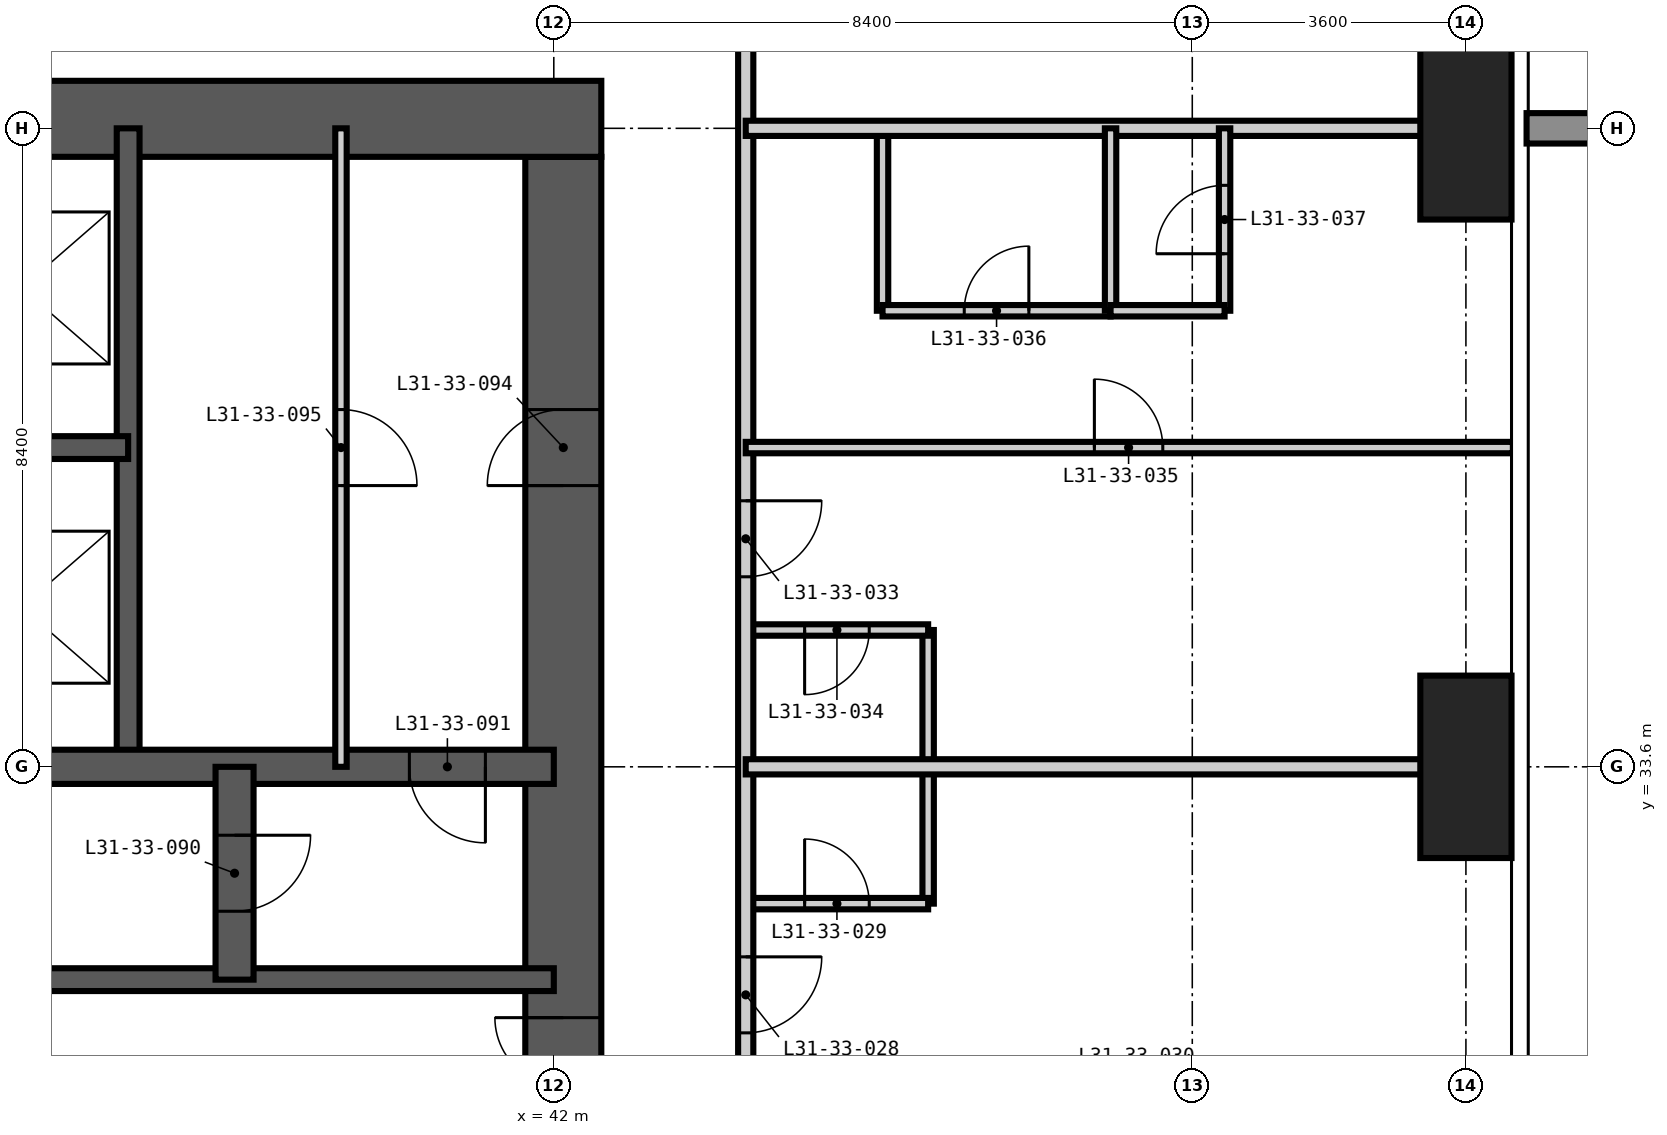
"""IFC4 building model, lengths in metres.
Left out: names, types, materials, properties, quantities, classifications, styles, units other than length and angle.
Written with IfcOpenShell. Run it as: python <this file> out.ifc"""

import sys

from ifc_helpers import new_model, si_unit, direction, frame, frame_2d, origin, origin_2d, place, context, subcontext, project, spatial, rectangle, extrude, element, fill, save


model = new_model("IFC4")
c1 = context("Model", 3, precision=1e-05, world=origin(), true_north=direction((0.0, 1.0)))
c2 = subcontext(c1, "Body", "Model", "MODEL_VIEW")
j1 = project(units=[si_unit("LENGTHUNIT", "METRE"), si_unit("PLANEANGLEUNIT", "RADIAN")], contexts=[c1])
p1 = place(None, origin())
s1 = spatial("IfcSite", under=j1, at=p1, CompositionType="ELEMENT")
p2 = place(p1, origin())
s2 = spatial("IfcBuilding", under=s1, at=p2, CompositionType="ELEMENT")
p3 = place(p2, frame((0.0, 0.0, 122.4)))
s3 = spatial("IfcBuildingStorey", under=s2, at=p3, CompositionType="ELEMENT", Elevation=122.4)
for number, where, z_axis, x_axis in (
    (1, (54.0, 33.6, -0.35), (0.0, 0.0, 1.0), (1.0, 0.0, 0.0)),
    (2, (54.0, 42.0, -0.35), (0.0, 0.0, 1.0), (1.0, 0.0, 0.0)),
):
    element("IfcColumn", number, at=place(p3, frame(where, z_axis=z_axis, x_axis=x_axis)), inside=s3, PredefinedType="COLUMN", context=c2, shape_type="SweptSolid", body=[
        extrude(rectangle(XDim=1.2, YDim=2.4, at=origin_2d()), origin(), (0.0, 0.0, 1.0), 3.6),
    ])
p4 = place(p3, frame((42.125, 17.175, -0.35), z_axis=(0.0, 0.0, 1.0), x_axis=(0.0, 1.0, 0.0)))
e3 = element("IfcWall", 3, at=p4, inside=s3, PredefinedType="SHEAR", context=c2, shape_type="SweptSolid", body=[
    extrude(rectangle(XDim=24.45, YDim=1.0, at=frame_2d((12.225, 0.0))), origin(), (0.0, 0.0, 1.0), 3.6),
])
p5 = place(p4, frame((0.425, 0.0, 0.35)))
e4 = element("IfcOpeningElement", 4, at=p5, cuts=e3, PredefinedType="OPENING", context=c2, shape_type="SweptSolid", body=[
    extrude(rectangle(XDim=1.2, YDim=2.2, at=frame_2d((0.6, 1.1))), frame((0.0, 0.51, 0.0), z_axis=(0.0, -1.0, 0.0), x_axis=(1.0, 0.0, 0.0)), (0.0, 0.0, 1.0), 1.02),
])
p6 = place(p4, frame((11.325, 0.0, 0.35)))
e5 = element("IfcOpeningElement", 5, at=p6, cuts=e3, PredefinedType="OPENING", context=c2, shape_type="SweptSolid", body=[
    extrude(rectangle(XDim=1.8, YDim=2.2, at=frame_2d((0.9, 1.1))), frame((0.0, 0.51, 0.0), z_axis=(0.0, -1.0, 0.0), x_axis=(1.0, 0.0, 0.0)), (0.0, 0.0, 1.0), 1.02),
])
p7 = place(p4, frame((20.125, 0.0, 0.35)))
e6 = element("IfcOpeningElement", 6, at=p7, cuts=e3, PredefinedType="OPENING", context=c2, shape_type="SweptSolid", body=[
    extrude(rectangle(XDim=1.0, YDim=2.1, at=frame_2d((0.5, 1.05))), frame((0.0, 0.51, 0.0), z_axis=(0.0, -1.0, 0.0), x_axis=(1.0, 0.0, 0.0)), (0.0, 0.0, 1.0), 1.02),
])
p8 = place(p3, frame((42.625, 42.125, -0.35), z_axis=(0.0, 0.0, 1.0), x_axis=(-1.0, 0.0, 0.0)))
e7 = element("IfcWall", 7, at=p8, inside=s3, PredefinedType="SHEAR", context=c2, shape_type="SweptSolid", body=[
    extrude(rectangle(XDim=26.45, YDim=1.0, at=frame_2d((13.225, 0.0))), origin(), (0.0, 0.0, 1.0), 3.6),
])
p9 = place(p8, frame((21.125, 0.0, 0.35)))
e8 = element("IfcOpeningElement", 8, at=p9, cuts=e7, PredefinedType="OPENING", context=c2, shape_type="SweptSolid", body=[
    extrude(rectangle(XDim=1.0, YDim=2.1, at=frame_2d((0.5, 1.05))), frame((0.0, 0.51, 0.0), z_axis=(0.0, -1.0, 0.0), x_axis=(1.0, 0.0, 0.0)), (0.0, 0.0, 1.0), 1.02),
])
p10 = place(p8, frame((10.525, 0.0, 0.35)))
e9 = element("IfcOpeningElement", 9, at=p10, cuts=e7, PredefinedType="OPENING", context=c2, shape_type="SweptSolid", body=[
    extrude(rectangle(XDim=1.2, YDim=2.2, at=frame_2d((0.6, 1.1))), frame((0.0, 0.51, 0.0), z_axis=(0.0, -1.0, 0.0), x_axis=(1.0, 0.0, 0.0)), (0.0, 0.0, 1.0), 1.02),
])
for number, where, z_axis, x_axis in (
    (10, (36.4, 33.6, -0.35), (0.0, 0.0, 1.0), (0.0, 1.0, 0.0)),
    (11, (33.6, 30.8, -0.35), (0.0, 0.0, 1.0), (1.0, 0.0, 0.0)),
):
    element("IfcWall", number, at=place(p3, frame(where, z_axis=z_axis, x_axis=x_axis)), inside=s3, PredefinedType="SHEAR", context=c2, shape_type="SweptSolid", body=[
        extrude(rectangle(XDim=8.4, YDim=0.3, at=frame_2d((4.2, 0.0))), origin(), (0.0, 0.0, 1.0), 3.6),
    ])
p11 = place(p3, frame((33.6, 37.8, -0.35), z_axis=(0.0, 0.0, 1.0), x_axis=(1.0, 0.0, 0.0)))
e12 = element("IfcWall", 12, at=p11, inside=s3, PredefinedType="SHEAR", context=c2, shape_type="SweptSolid", body=[
    extrude(rectangle(XDim=2.8, YDim=0.3, at=frame_2d((1.4, 0.0))), origin(), (0.0, 0.0, 1.0), 3.6),
])
p12 = place(p3, frame((16.8, 33.6, -0.35), z_axis=(0.0, 0.0, 1.0), x_axis=(1.0, 0.0, 0.0)))
e13 = element("IfcWall", 13, at=p12, inside=s3, PredefinedType="SHEAR", context=c2, shape_type="SweptSolid", body=[
    extrude(rectangle(XDim=25.2, YDim=0.45, at=frame_2d((12.6, 0.0))), origin(), (0.0, 0.0, 1.0), 3.6),
])
p13 = place(p12, frame((23.3, 0.0, 0.35)))
e14 = element("IfcOpeningElement", 14, at=p13, cuts=e13, PredefinedType="OPENING", context=c2, shape_type="SweptSolid", body=[
    extrude(rectangle(XDim=1.0, YDim=2.1, at=frame_2d((0.5, 1.05))), frame((0.0, 0.235, 0.0), z_axis=(0.0, -1.0, 0.0), x_axis=(1.0, 0.0, 0.0)), (0.0, 0.0, 1.0), 0.47),
])
p14 = place(p3, frame((37.8, 30.8, -0.35), z_axis=(0.0, 0.0, 1.0), x_axis=(0.0, 1.0, 0.0)))
e15 = element("IfcWall", 15, at=p14, inside=s3, PredefinedType="SHEAR", context=c2, shape_type="SweptSolid", body=[
    extrude(rectangle(XDim=2.8, YDim=0.5, at=frame_2d((1.4, 0.0))), origin(), (0.0, 0.0, 1.0), 3.6),
])
p15 = place(p14, frame((0.9, 0.0, 0.35)))
e16 = element("IfcOpeningElement", 16, at=p15, cuts=e15, PredefinedType="OPENING", context=c2, shape_type="SweptSolid", body=[
    extrude(rectangle(XDim=1.0, YDim=2.1, at=frame_2d((0.5, 1.05))), frame((0.0, 0.26, 0.0), z_axis=(0.0, -1.0, 0.0), x_axis=(1.0, 0.0, 0.0)), (0.0, 0.0, 1.0), 0.52),
])
p16 = place(p3, frame((46.325, 39.6, 0.0), z_axis=(0.0, 0.0, 1.0), x_axis=(0.0, 1.0, 0.0)))
e17 = element("IfcWall", 17, at=p16, inside=s3, PredefinedType="PARTITIONING", context=c2, shape_type="SweptSolid", body=[
    extrude(rectangle(XDim=2.4, YDim=0.15, at=frame_2d((1.2, 0.0))), origin(), (0.0, 0.0, 1.0), 3.25),
])
p17 = place(p3, frame((46.925, 31.8, 0.0), z_axis=(0.0, 0.0, 1.0), x_axis=(0.0, 1.0, 0.0)))
e18 = element("IfcWall", 18, at=p17, inside=s3, PredefinedType="PARTITIONING", context=c2, shape_type="SweptSolid", body=[
    extrude(rectangle(XDim=3.6, YDim=0.15, at=frame_2d((1.8, 0.0))), origin(), (0.0, 0.0, 1.0), 3.25),
])
p18 = place(p3, frame((44.525, 31.8, 0.0), z_axis=(0.0, 0.0, 1.0), x_axis=(1.0, 0.0, 0.0)))
e19 = element("IfcWall", 19, at=p18, inside=s3, PredefinedType="PARTITIONING", context=c2, shape_type="SweptSolid", body=[
    extrude(rectangle(XDim=2.4, YDim=0.15, at=frame_2d((1.2, 0.0))), origin(), (0.0, 0.0, 1.0), 3.25),
])
p19 = place(p18, frame((0.775, 0.0, 0.0)))
e20 = element("IfcOpeningElement", 20, at=p19, cuts=e19, PredefinedType="OPENING", context=c2, shape_type="SweptSolid", body=[
    extrude(rectangle(XDim=0.85, YDim=2.1, at=frame_2d((0.425, 1.05))), frame((0.0, 0.085, 0.0), z_axis=(0.0, -1.0, 0.0), x_axis=(1.0, 0.0, 0.0)), (0.0, 0.0, 1.0), 0.17),
])
p20 = place(p3, frame((44.525, 35.4, 0.0), z_axis=(0.0, 0.0, 1.0), x_axis=(1.0, 0.0, 0.0)))
e21 = element("IfcWall", 21, at=p20, inside=s3, PredefinedType="PARTITIONING", context=c2, shape_type="SweptSolid", body=[
    extrude(rectangle(XDim=2.4, YDim=0.15, at=frame_2d((1.2, 0.0))), origin(), (0.0, 0.0, 1.0), 3.25),
])
p21 = place(p20, frame((0.775, 0.0, 0.0)))
e22 = element("IfcOpeningElement", 22, at=p21, cuts=e21, PredefinedType="OPENING", context=c2, shape_type="SweptSolid", body=[
    extrude(rectangle(XDim=0.85, YDim=2.1, at=frame_2d((0.425, 1.05))), frame((0.0, 0.085, 0.0), z_axis=(0.0, -1.0, 0.0), x_axis=(1.0, 0.0, 0.0)), (0.0, 0.0, 1.0), 0.17),
])
p22 = place(p3, frame((46.325, 39.6, 0.0), z_axis=(0.0, 0.0, 1.0), x_axis=(1.0, 0.0, 0.0)))
e23 = element("IfcWall", 23, at=p22, inside=s3, PredefinedType="PARTITIONING", context=c2, shape_type="SweptSolid", body=[
    extrude(rectangle(XDim=3.0, YDim=0.15, at=frame_2d((1.5, 0.0))), origin(), (0.0, 0.0, 1.0), 3.25),
])
p23 = place(p22, frame((1.075, 0.0, 0.0)))
e24 = element("IfcOpeningElement", 24, at=p23, cuts=e23, PredefinedType="OPENING", context=c2, shape_type="SweptSolid", body=[
    extrude(rectangle(XDim=0.85, YDim=2.1, at=frame_2d((0.425, 1.05))), frame((0.0, 0.085, 0.0), z_axis=(0.0, -1.0, 0.0), x_axis=(1.0, 0.0, 0.0)), (0.0, 0.0, 1.0), 0.17),
])
p24 = place(p3, frame((44.525, 45.725, 0.0), z_axis=(0.0, 0.0, 1.0), x_axis=(0.0, -1.0, 0.0)))
e25 = element("IfcWall", 25, at=p24, inside=s3, PredefinedType="PARTITIONING", context=c2, shape_type="SweptSolid", body=[
    extrude(rectangle(XDim=32.05, YDim=0.2, at=frame_2d((16.025, 0.0))), origin(), (0.0, 0.0, 1.0), 3.25),
])
p25 = place(p24, frame((25.425, 0.0, 0.0)))
e26 = element("IfcOpeningElement", 26, at=p25, cuts=e25, PredefinedType="OPENING", context=c2, shape_type="SweptSolid", body=[
    extrude(rectangle(XDim=1.0, YDim=2.2, at=frame_2d((0.5, 1.1))), frame((0.0, 0.11, 0.0), z_axis=(0.0, -1.0, 0.0), x_axis=(1.0, 0.0, 0.0)), (0.0, 0.0, 1.0), 0.22),
])
p26 = place(p24, frame((14.625, 0.0, 0.0)))
e27 = element("IfcOpeningElement", 27, at=p26, cuts=e25, PredefinedType="OPENING", context=c2, shape_type="SweptSolid", body=[
    extrude(rectangle(XDim=1.0, YDim=2.2, at=frame_2d((0.5, 1.1))), frame((0.0, 0.11, 0.0), z_axis=(0.0, -1.0, 0.0), x_axis=(1.0, 0.0, 0.0)), (0.0, 0.0, 1.0), 0.22),
])
p27 = place(p24, frame((8.625, 0.0, 0.0)))
e28 = element("IfcOpeningElement", 28, at=p27, cuts=e25, PredefinedType="OPENING", context=c2, shape_type="SweptSolid", body=[
    extrude(rectangle(XDim=1.0, YDim=2.2, at=frame_2d((0.5, 1.1))), frame((0.0, 0.11, 0.0), z_axis=(0.0, -1.0, 0.0), x_axis=(1.0, 0.0, 0.0)), (0.0, 0.0, 1.0), 0.22),
])
p28 = place(p24, frame((29.987, 0.0, 0.0)))
e29 = element("IfcOpeningElement", 29, at=p28, cuts=e25, PredefinedType="OPENING", context=c2, shape_type="SweptSolid", body=[
    extrude(rectangle(XDim=1.0, YDim=2.2, at=frame_2d((0.5, 1.1))), frame((0.0, 0.11, 0.0), z_axis=(0.0, -1.0, 0.0), x_axis=(1.0, 0.0, 0.0)), (0.0, 0.0, 1.0), 0.22),
])
p29 = place(p24, frame((1.363, 0.0, 0.0)))
e30 = element("IfcOpeningElement", 30, at=p29, cuts=e25, PredefinedType="OPENING", context=c2, shape_type="SweptSolid", body=[
    extrude(rectangle(XDim=1.0, YDim=2.2, at=frame_2d((0.5, 1.1))), frame((0.0, 0.11, 0.0), z_axis=(0.0, -1.0, 0.0), x_axis=(1.0, 0.0, 0.0)), (0.0, 0.0, 1.0), 0.22),
])
for number, where, z_axis, x_axis in (
    (31, (44.525, 33.6, 0.0), (0.0, 0.0, 1.0), (1.0, 0.0, 0.0)),
    (32, (44.525, 42.0, 0.0), (0.0, 0.0, 1.0), (1.0, 0.0, 0.0)),
):
    element("IfcWall", number, at=place(p3, frame(where, z_axis=z_axis, x_axis=x_axis)), inside=s3, PredefinedType="PARTITIONING", context=c2, shape_type="SweptSolid", body=[
        extrude(rectangle(XDim=10.093, YDim=0.2, at=frame_2d((5.046, 0.0))), origin(), (0.0, 0.0, 1.0), 3.25),
    ])
p30 = place(p3, frame((39.2, 33.6, 0.0), z_axis=(0.0, 0.0, 1.0), x_axis=(0.0, 1.0, 0.0)))
e33 = element("IfcWall", 33, at=p30, inside=s3, PredefinedType="PARTITIONING", context=c2, shape_type="SweptSolid", body=[
    extrude(rectangle(XDim=8.4, YDim=0.15, at=frame_2d((4.2, 0.0))), origin(), (0.0, 0.0, 1.0), 3.25),
])
p31 = place(p30, frame((3.7, 0.0, 0.0)))
e34 = element("IfcOpeningElement", 34, at=p31, cuts=e33, PredefinedType="OPENING", context=c2, shape_type="SweptSolid", body=[
    extrude(rectangle(XDim=1.0, YDim=2.1, at=frame_2d((0.5, 1.05))), frame((0.0, 0.085, 0.0), z_axis=(0.0, -1.0, 0.0), x_axis=(1.0, 0.0, 0.0)), (0.0, 0.0, 1.0), 0.17),
])
p32 = place(p3, frame((49.325, 39.6, 0.0), z_axis=(0.0, 0.0, 1.0), x_axis=(0.0, 1.0, 0.0)))
e35 = element("IfcWall", 35, at=p32, inside=s3, PredefinedType="PARTITIONING", context=c2, shape_type="SweptSolid", body=[
    extrude(rectangle(XDim=2.4, YDim=0.15, at=frame_2d((1.2, 0.0))), origin(), (0.0, 0.0, 1.0), 3.25),
])
p33 = place(p3, frame((50.825, 39.6, 0.0), z_axis=(0.0, 0.0, 1.0), x_axis=(0.0, 1.0, 0.0)))
e36 = element("IfcWall", 36, at=p33, inside=s3, PredefinedType="PARTITIONING", context=c2, shape_type="SweptSolid", body=[
    extrude(rectangle(XDim=2.4, YDim=0.15, at=frame_2d((1.2, 0.0))), origin(), (0.0, 0.0, 1.0), 3.25),
])
p34 = place(p33, frame((0.75, 0.0, 0.0)))
e37 = element("IfcOpeningElement", 37, at=p34, cuts=e36, PredefinedType="OPENING", context=c2, shape_type="SweptSolid", body=[
    extrude(rectangle(XDim=0.9, YDim=2.1, at=frame_2d((0.45, 1.05))), frame((0.0, 0.085, 0.0), z_axis=(0.0, -1.0, 0.0), x_axis=(1.0, 0.0, 0.0)), (0.0, 0.0, 1.0), 0.17),
])
p35 = place(p3, frame((44.525, 37.8, 0.0), z_axis=(0.0, 0.0, 1.0), x_axis=(1.0, 0.0, 0.0)))
e38 = element("IfcWall", 38, at=p35, inside=s3, PredefinedType="PARTITIONING", context=c2, shape_type="SweptSolid", body=[
    extrude(rectangle(XDim=10.093, YDim=0.15, at=frame_2d((5.046, 0.0))), origin(), (0.0, 0.0, 1.0), 3.25),
])
p36 = place(p35, frame((4.587, 0.0, 0.0)))
e39 = element("IfcOpeningElement", 39, at=p36, cuts=e38, PredefinedType="OPENING", context=c2, shape_type="SweptSolid", body=[
    extrude(rectangle(XDim=0.9, YDim=2.1, at=frame_2d((0.45, 1.05))), frame((0.0, 0.085, 0.0), z_axis=(0.0, -1.0, 0.0), x_axis=(1.0, 0.0, 0.0)), (0.0, 0.0, 1.0), 0.17),
])
p37 = place(p3, frame((49.325, 39.6, 0.0), z_axis=(0.0, 0.0, 1.0), x_axis=(1.0, 0.0, 0.0)))
e40 = element("IfcWall", 40, at=p37, inside=s3, PredefinedType="PARTITIONING", context=c2, shape_type="SweptSolid", body=[
    extrude(rectangle(XDim=1.5, YDim=0.15, at=frame_2d((0.75, 0.0))), origin(), (0.0, 0.0, 1.0), 3.25),
])
p38 = place(p26, origin())
e41 = element("IfcDoor", 41, at=p38, inside=s3, OperationType="SINGLE_SWING_LEFT", PredefinedType="DOOR", context=c2, shape_type="SweptSolid", body=[
    extrude(rectangle(XDim=1.0, YDim=2.2, at=frame_2d((0.5, 1.1))), frame((0.0, 0.025, 0.0), z_axis=(0.0, -1.0, 0.0), x_axis=(1.0, 0.0, 0.0)), (0.0, 0.0, 1.0), 0.05),
])
fill(e27, e41)
p39 = place(p19, origin())
e42 = element("IfcDoor", 42, at=p39, inside=s3, OperationType="SINGLE_SWING_LEFT", PredefinedType="DOOR", context=c2, shape_type="SweptSolid", body=[
    extrude(rectangle(XDim=0.85, YDim=2.1, at=frame_2d((0.425, 1.05))), frame((0.0, 0.025, 0.0), z_axis=(0.0, -1.0, 0.0), x_axis=(1.0, 0.0, 0.0)), (0.0, 0.0, 1.0), 0.05),
])
fill(e20, e42)
p40 = place(p27, origin())
e43 = element("IfcDoor", 43, at=p40, inside=s3, OperationType="SINGLE_SWING_LEFT", PredefinedType="DOOR", context=c2, shape_type="SweptSolid", body=[
    extrude(rectangle(XDim=1.0, YDim=2.2, at=frame_2d((0.5, 1.1))), frame((0.0, 0.025, 0.0), z_axis=(0.0, -1.0, 0.0), x_axis=(1.0, 0.0, 0.0)), (0.0, 0.0, 1.0), 0.05),
])
fill(e28, e43)
p41 = place(p21, frame((0.85, 0.0, 0.0), z_axis=(0.0, 0.0, 1.0), x_axis=(-1.0, 0.0, 0.0)))
e44 = element("IfcDoor", 44, at=p41, inside=s3, OperationType="SINGLE_SWING_RIGHT", PredefinedType="DOOR", context=c2, shape_type="SweptSolid", body=[
    extrude(rectangle(XDim=0.85, YDim=2.1, at=frame_2d((0.425, 1.05))), frame((0.0, 0.025, 0.0), z_axis=(0.0, -1.0, 0.0), x_axis=(1.0, 0.0, 0.0)), (0.0, 0.0, 1.0), 0.05),
])
fill(e22, e44)
p42 = place(p36, origin())
e45 = element("IfcDoor", 45, at=p42, inside=s3, OperationType="SINGLE_SWING_LEFT", PredefinedType="DOOR", context=c2, shape_type="SweptSolid", body=[
    extrude(rectangle(XDim=0.9, YDim=2.1, at=frame_2d((0.45, 1.05))), frame((0.0, 0.025, 0.0), z_axis=(0.0, -1.0, 0.0), x_axis=(1.0, 0.0, 0.0)), (0.0, 0.0, 1.0), 0.05),
])
fill(e39, e45)
p43 = place(p23, origin())
e46 = element("IfcDoor", 46, at=p43, inside=s3, OperationType="SINGLE_SWING_RIGHT", PredefinedType="DOOR", context=c2, shape_type="SweptSolid", body=[
    extrude(rectangle(XDim=0.85, YDim=2.1, at=frame_2d((0.425, 1.05))), frame((0.0, 0.025, 0.0), z_axis=(0.0, -1.0, 0.0), x_axis=(1.0, 0.0, 0.0)), (0.0, 0.0, 1.0), 0.05),
])
fill(e24, e46)
p44 = place(p34, origin())
e47 = element("IfcDoor", 47, at=p44, inside=s3, OperationType="SINGLE_SWING_LEFT", PredefinedType="DOOR", context=c2, shape_type="SweptSolid", body=[
    extrude(rectangle(XDim=0.9, YDim=2.1, at=frame_2d((0.45, 1.05))), frame((0.0, 0.025, 0.0), z_axis=(0.0, -1.0, 0.0), x_axis=(1.0, 0.0, 0.0)), (0.0, 0.0, 1.0), 0.05),
])
fill(e37, e47)
p45 = place(p15, frame((1.0, 0.0, 0.0), z_axis=(0.0, 0.0, 1.0), x_axis=(-1.0, 0.0, 0.0)))
e48 = element("IfcDoor", 48, at=p45, inside=s3, OperationType="SINGLE_SWING_LEFT", PredefinedType="DOOR", context=c2, shape_type="SweptSolid", body=[
    extrude(rectangle(XDim=1.0, YDim=2.1, at=frame_2d((0.5, 1.05))), frame((0.0, 0.025, 0.0), z_axis=(0.0, -1.0, 0.0), x_axis=(1.0, 0.0, 0.0)), (0.0, 0.0, 1.0), 0.05),
])
fill(e16, e48)
p46 = place(p13, frame((1.0, 0.0, 0.0), z_axis=(0.0, 0.0, 1.0), x_axis=(-1.0, 0.0, 0.0)))
e49 = element("IfcDoor", 49, at=p46, inside=s3, OperationType="SINGLE_SWING_LEFT", PredefinedType="DOOR", context=c2, shape_type="SweptSolid", body=[
    extrude(rectangle(XDim=1.0, YDim=2.1, at=frame_2d((0.5, 1.05))), frame((0.0, 0.025, 0.0), z_axis=(0.0, -1.0, 0.0), x_axis=(1.0, 0.0, 0.0)), (0.0, 0.0, 1.0), 0.05),
])
fill(e14, e49)
p47 = place(p6, origin())
e50 = element("IfcDoor", 50, at=p47, inside=s3, OperationType="DOUBLE_DOOR_DOUBLE_SWING", PredefinedType="DOOR", context=c2, shape_type="SweptSolid", body=[
    extrude(rectangle(XDim=1.8, YDim=2.2, at=frame_2d((0.9, 1.1))), frame((0.0, 0.025, 0.0), z_axis=(0.0, -1.0, 0.0), x_axis=(1.0, 0.0, 0.0)), (0.0, 0.0, 1.0), 0.05),
])
fill(e5, e50)
p48 = place(p7, origin())
e51 = element("IfcDoor", 51, at=p48, inside=s3, OperationType="SINGLE_SWING_LEFT", PredefinedType="DOOR", context=c2, shape_type="SweptSolid", body=[
    extrude(rectangle(XDim=1.0, YDim=2.1, at=frame_2d((0.5, 1.05))), frame((0.0, 0.025, 0.0), z_axis=(0.0, -1.0, 0.0), x_axis=(1.0, 0.0, 0.0)), (0.0, 0.0, 1.0), 0.05),
])
fill(e6, e51)
p49 = place(p31, frame((1.0, 0.0, 0.0), z_axis=(0.0, 0.0, 1.0), x_axis=(-1.0, 0.0, 0.0)))
e52 = element("IfcDoor", 52, at=p49, inside=s3, OperationType="SINGLE_SWING_RIGHT", PredefinedType="DOOR", context=c2, shape_type="SweptSolid", body=[
    extrude(rectangle(XDim=1.0, YDim=2.1, at=frame_2d((0.5, 1.05))), frame((0.0, 0.025, 0.0), z_axis=(0.0, -1.0, 0.0), x_axis=(1.0, 0.0, 0.0)), (0.0, 0.0, 1.0), 0.05),
])
fill(e34, e52)
save(model, sys.argv[1])
